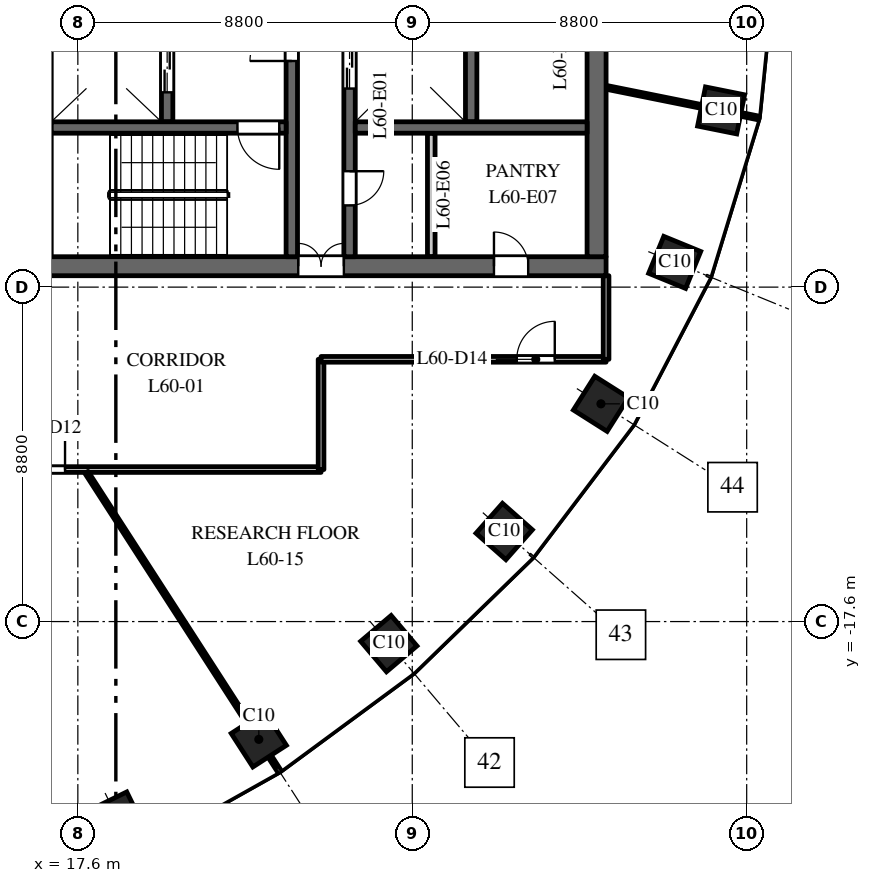
"""IFC4 building model, lengths in metres.
Left out: names, types, materials, properties, quantities, classifications, styles, units other than length and angle.
Written with IfcOpenShell. Run it as: python <this file> out.ifc"""

import sys

from ifc_helpers import new_model, si_unit, direction, frame, frame_2d, origin, origin_2d, place, context, subcontext, project, spatial, rectangle, extrude, element, fill, save


model = new_model("IFC4")
c1 = context("Model", 3, precision=1e-05, world=origin(), true_north=direction((0.0, 1.0)))
c2 = subcontext(c1, "Body", "Model", "MODEL_VIEW")
j1 = project(units=[si_unit("LENGTHUNIT", "METRE"), si_unit("PLANEANGLEUNIT", "RADIAN")], contexts=[c1])
p1 = place(None, origin())
s1 = spatial("IfcSite", under=j1, at=p1, CompositionType="ELEMENT")
p2 = place(p1, origin())
s2 = spatial("IfcBuilding", under=s1, at=p2, CompositionType="ELEMENT")
p3 = place(p2, frame((0.0, 0.0, 281.5)))
s3 = spatial("IfcBuildingStorey", under=s2, at=p3, CompositionType="ELEMENT", Elevation=281.5)
for number, where, z_axis, x_axis in (
    (1, (18.646, -22.785, 0.0), (0.0, 0.0, 1.0), (0.898, 0.439, 0.0)),
    (2, (22.362, -20.7, 0.0), (0.0, 0.0, 1.0), (0.84, 0.542, 0.0)),
    (3, (25.783, -18.18, 0.0), (0.0, 0.0, 1.0), (0.763, 0.646, 0.0)),
    (4, (28.819, -15.23, 0.0), (0.0, 0.0, 1.0), (0.663, 0.749, 0.0)),
    (5, (31.365, -11.871, 0.0), (0.0, 0.0, 1.0), (0.535, 0.845, 0.0)),
    (6, (33.305, -8.149, 0.0), (0.0, 0.0, 1.0), (0.379, 0.925, 0.0)),
    (7, (34.527, -4.151, 0.0), (0.0, 0.0, 1.0), (0.197, 0.98, 0.0)),
):
    element("IfcColumn", number, at=place(p3, frame(where, z_axis=z_axis, x_axis=x_axis)), inside=s3, PredefinedType="COLUMN", context=c2, shape_type="SweptSolid", body=[
        extrude(rectangle(XDim=1.05, YDim=1.05, at=origin_2d()), origin(), (0.0, 0.0, 1.0), 4.0),
    ])
p4 = place(p3, frame((16.5, -8.25, 0.0), z_axis=(0.0, 0.0, 1.0), x_axis=(1.0, 0.0, 0.0)))
e8 = element("IfcWall", 8, at=p4, inside=s3, PredefinedType="SHEAR", context=c2, shape_type="SweptSolid", body=[
    extrude(rectangle(XDim=15.0, YDim=0.5, at=frame_2d((7.5, 0.0))), origin(), (0.0, 0.0, 1.0), 3.7),
])
p5 = place(p4, frame((6.9, 0.0, 0.0)))
e9 = element("IfcOpeningElement", 9, at=p5, cuts=e8, PredefinedType="OPENING", context=c2, shape_type="SweptSolid", body=[
    extrude(rectangle(XDim=1.2, YDim=2.1, at=frame_2d((0.6, 1.05))), frame((0.0, 0.26, 0.0), z_axis=(0.0, -1.0, 0.0), x_axis=(1.0, 0.0, 0.0)), (0.0, 0.0, 1.0), 0.52),
])
p6 = place(p4, frame((12.05, 0.0, 0.0)))
e10 = element("IfcOpeningElement", 10, at=p6, cuts=e8, PredefinedType="OPENING", context=c2, shape_type="SweptSolid", body=[
    extrude(rectangle(XDim=0.9, YDim=2.1, at=frame_2d((0.45, 1.05))), frame((0.0, 0.26, 0.0), z_axis=(0.0, -1.0, 0.0), x_axis=(1.0, 0.0, 0.0)), (0.0, 0.0, 1.0), 0.52),
])
p7 = place(p3, frame((27.95, -4.45, 0.0), z_axis=(0.0, 0.0, 1.0), x_axis=(0.0, 1.0, 0.0)))
e11 = element("IfcWall", 11, at=p7, inside=s3, PredefinedType="SHEAR", context=c2, shape_type="SweptSolid", body=[
    extrude(rectangle(XDim=8.9, YDim=0.3, at=frame_2d((4.45, 0.0))), origin(), (0.0, 0.0, 1.0), 3.7),
])
p8 = place(p3, frame((19.95, -4.45, 0.0), z_axis=(0.0, 0.0, 1.0), x_axis=(0.0, 1.0, 0.0)))
e12 = element("IfcWall", 12, at=p8, inside=s3, PredefinedType="SHEAR", context=c2, shape_type="SweptSolid", body=[
    extrude(rectangle(XDim=8.9, YDim=0.3, at=frame_2d((4.45, 0.0))), origin(), (0.0, 0.0, 1.0), 3.7),
])
p9 = place(p8, frame((0.775, 0.0, 0.0)))
e13 = element("IfcOpeningElement", 13, at=p9, cuts=e12, PredefinedType="OPENING", context=c2, shape_type="SweptSolid", body=[
    extrude(rectangle(XDim=1.2, YDim=2.1, at=frame_2d((0.6, 1.05))), frame((0.0, 0.16, 0.0), z_axis=(0.0, -1.0, 0.0), x_axis=(1.0, 0.0, 0.0)), (0.0, 0.0, 1.0), 0.32),
])
p10 = place(p8, frame((4.675, 0.0, 0.0)))
e14 = element("IfcOpeningElement", 14, at=p10, cuts=e12, PredefinedType="OPENING", context=c2, shape_type="SweptSolid", body=[
    extrude(rectangle(XDim=1.1, YDim=2.1, at=frame_2d((0.55, 1.05))), frame((0.0, 0.16, 0.0), z_axis=(0.0, -1.0, 0.0), x_axis=(1.0, 0.0, 0.0)), (0.0, 0.0, 1.0), 0.32),
])
p11 = place(p8, frame((7.25, 0.0, 0.0)))
e15 = element("IfcOpeningElement", 15, at=p11, cuts=e12, PredefinedType="OPENING", context=c2, shape_type="SweptSolid", body=[
    extrude(rectangle(XDim=1.1, YDim=2.1, at=frame_2d((0.55, 1.05))), frame((0.0, 0.16, 0.0), z_axis=(0.0, -1.0, 0.0), x_axis=(1.0, 0.0, 0.0)), (0.0, 0.0, 1.0), 0.32),
])
p12 = place(p3, frame((24.75, -8.0, 0.0), z_axis=(0.0, 0.0, 1.0), x_axis=(0.0, 1.0, 0.0)))
e16 = element("IfcWall", 16, at=p12, inside=s3, PredefinedType="SHEAR", context=c2, shape_type="SweptSolid", body=[
    extrude(rectangle(XDim=16.0, YDim=0.3, at=frame_2d((8.0, 0.0))), origin(), (0.0, 0.0, 1.0), 3.7),
])
p13 = place(p12, frame((4.425, 0.0, 0.0)))
e17 = element("IfcOpeningElement", 17, at=p13, cuts=e16, PredefinedType="OPENING", context=c2, shape_type="SweptSolid", body=[
    extrude(rectangle(XDim=1.1, YDim=2.1, at=frame_2d((0.55, 1.05))), frame((0.0, 0.16, 0.0), z_axis=(0.0, -1.0, 0.0), x_axis=(1.0, 0.0, 0.0)), (0.0, 0.0, 1.0), 0.32),
])
p14 = place(p12, frame((7.45, 0.0, 0.0)))
e18 = element("IfcOpeningElement", 18, at=p14, cuts=e16, PredefinedType="OPENING", context=c2, shape_type="SweptSolid", body=[
    extrude(rectangle(XDim=1.1, YDim=2.1, at=frame_2d((0.55, 1.05))), frame((0.0, 0.16, 0.0), z_axis=(0.0, -1.0, 0.0), x_axis=(1.0, 0.0, 0.0)), (0.0, 0.0, 1.0), 0.32),
])
p15 = place(p12, frame((10.475, 0.0, 0.0)))
e19 = element("IfcOpeningElement", 19, at=p15, cuts=e16, PredefinedType="OPENING", context=c2, shape_type="SweptSolid", body=[
    extrude(rectangle(XDim=1.1, YDim=2.1, at=frame_2d((0.55, 1.05))), frame((0.0, 0.16, 0.0), z_axis=(0.0, -1.0, 0.0), x_axis=(1.0, 0.0, 0.0)), (0.0, 0.0, 1.0), 0.32),
])
p16 = place(p12, frame((13.75, 0.0, 0.0)))
e20 = element("IfcOpeningElement", 20, at=p16, cuts=e16, PredefinedType="OPENING", context=c2, shape_type="SweptSolid", body=[
    extrude(rectangle(XDim=0.9, YDim=2.1, at=frame_2d((0.45, 1.05))), frame((0.0, 0.16, 0.0), z_axis=(0.0, -1.0, 0.0), x_axis=(1.0, 0.0, 0.0)), (0.0, 0.0, 1.0), 0.32),
])
p17 = place(p12, frame((1.35, 0.0, 0.0)))
e21 = element("IfcOpeningElement", 21, at=p17, cuts=e16, PredefinedType="OPENING", context=c2, shape_type="SweptSolid", body=[
    extrude(rectangle(XDim=0.9, YDim=2.1, at=frame_2d((0.45, 1.05))), frame((0.0, 0.16, 0.0), z_axis=(0.0, -1.0, 0.0), x_axis=(1.0, 0.0, 0.0)), (0.0, 0.0, 1.0), 0.32),
])
p18 = place(p3, frame((31.25, -8.0, 0.0), z_axis=(0.0, 0.0, 1.0), x_axis=(0.0, 1.0, 0.0)))
e22 = element("IfcWall", 22, at=p18, inside=s3, PredefinedType="SHEAR", context=c2, shape_type="SweptSolid", body=[
    extrude(rectangle(XDim=16.0, YDim=0.5, at=frame_2d((8.0, 0.0))), origin(), (0.0, 0.0, 1.0), 3.7),
])
p19 = place(p3, frame((26.9, -8.0, 0.0), z_axis=(0.0, 0.0, 1.0), x_axis=(0.0, 1.0, 0.0)))
e23 = element("IfcWall", 23, at=p19, inside=s3, PredefinedType="PARTITIONING", context=c2, shape_type="SweptSolid", body=[
    extrude(rectangle(XDim=3.25, YDim=0.2, at=frame_2d((1.625, 0.0))), origin(), (0.0, 0.0, 1.0), 3.7),
])
p20 = place(p3, frame((24.9, -4.6, 0.0), z_axis=(0.0, 0.0, 1.0), x_axis=(1.0, 0.0, 0.0)))
e24 = element("IfcWall", 24, at=p20, inside=s3, PredefinedType="SHEAR", context=c2, shape_type="SweptSolid", body=[
    extrude(rectangle(XDim=6.1, YDim=0.3, at=frame_2d((3.05, 0.0))), origin(), (0.0, 0.0, 1.0), 3.7),
])
p21 = place(p3, frame((23.23, -8.0, 0.0), z_axis=(0.0, 0.0, 1.0), x_axis=(0.0, 1.0, 0.0)))
e25 = element("IfcWall", 25, at=p21, inside=s3, PredefinedType="SHEAR", context=c2, shape_type="SweptSolid", body=[
    extrude(rectangle(XDim=7.875, YDim=0.3, at=frame_2d((3.938, 0.0))), origin(), (0.0, 0.0, 1.0), 3.7),
])
p22 = place(p21, frame((5.15, 0.0, 0.0)))
e26 = element("IfcOpeningElement", 26, at=p22, cuts=e25, PredefinedType="OPENING", context=c2, shape_type="SweptSolid", body=[
    extrude(rectangle(XDim=1.1, YDim=2.1, at=frame_2d((0.55, 1.05))), frame((0.0, 0.16, 0.0), z_axis=(0.0, -1.0, 0.0), x_axis=(1.0, 0.0, 0.0)), (0.0, 0.0, 1.0), 0.32),
])
p23 = place(p3, frame((16.9, -4.6, 0.0), z_axis=(0.0, 0.0, 1.0), x_axis=(1.0, 0.0, 0.0)))
e27 = element("IfcWall", 27, at=p23, inside=s3, PredefinedType="SHEAR", context=c2, shape_type="SweptSolid", body=[
    extrude(rectangle(XDim=6.18, YDim=0.3, at=frame_2d((3.09, 0.0))), origin(), (0.0, 0.0, 1.0), 3.7),
])
p24 = place(p23, frame((4.9, 0.0, 0.0)))
e28 = element("IfcOpeningElement", 28, at=p24, cuts=e27, PredefinedType="OPENING", context=c2, shape_type="SweptSolid", body=[
    extrude(rectangle(XDim=1.1, YDim=2.1, at=frame_2d((0.55, 1.05))), frame((0.0, 0.16, 0.0), z_axis=(0.0, -1.0, 0.0), x_axis=(1.0, 0.0, 0.0)), (0.0, 0.0, 1.0), 0.32),
])
p25 = place(p3, frame((0.613, -13.6, 0.0), z_axis=(0.0, 0.0, 1.0), x_axis=(1.0, 0.0, 0.0)))
e29 = element("IfcWall", 29, at=p25, inside=s3, PredefinedType="PARTITIONING", context=c2, shape_type="SweptSolid", body=[
    extrude(rectangle(XDim=23.387, YDim=0.15, at=frame_2d((11.693, 0.0))), origin(), (0.0, 0.0, 1.0), 2.85),
])
p26 = place(p25, frame((15.65, 0.0, 0.0)))
e30 = element("IfcOpeningElement", 30, at=p26, cuts=e29, PredefinedType="OPENING", context=c2, shape_type="SweptSolid", body=[
    extrude(rectangle(XDim=1.0, YDim=2.1, at=frame_2d((0.5, 1.05))), frame((0.0, 0.085, 0.0), z_axis=(0.0, -1.0, 0.0), x_axis=(1.0, 0.0, 0.0)), (0.0, 0.0, 1.0), 0.17),
])
p27 = place(p3, frame((17.828, -13.675, 0.0), z_axis=(0.0, 0.0, 1.0), x_axis=(0.542255150075, -0.840213872902, 0.0)))
e31 = element("IfcWall", 31, at=p27, inside=s3, PredefinedType="PARTITIONING", context=c2, shape_type="SweptSolid", body=[
    extrude(rectangle(XDim=9.363, YDim=0.1, at=frame_2d((4.682, 0.0))), origin(), (0.0, 0.0, 1.0), 3.7),
])
p28 = place(p3, frame((24.0, -13.6, 0.0), z_axis=(0.0, 0.0, 1.0), x_axis=(0.0, 1.0, 0.0)))
e32 = element("IfcWall", 32, at=p28, inside=s3, PredefinedType="PARTITIONING", context=c2, shape_type="SweptSolid", body=[
    extrude(rectangle(XDim=2.9, YDim=0.15, at=frame_2d((1.45, 0.0))), origin(), (0.0, 0.0, 1.0), 2.75),
])
p29 = place(p3, frame((24.0, -10.7, 0.0), z_axis=(0.0, 0.0, 1.0), x_axis=(1.0, 0.0, 0.0)))
e33 = element("IfcWall", 33, at=p29, inside=s3, PredefinedType="PARTITIONING", context=c2, shape_type="SweptSolid", body=[
    extrude(rectangle(XDim=7.5, YDim=0.15, at=frame_2d((3.75, 0.0))), origin(), (0.0, 0.0, 1.0), 3.0),
])
p30 = place(p29, frame((5.15, 0.0, 0.0)))
e34 = element("IfcOpeningElement", 34, at=p30, cuts=e33, PredefinedType="OPENING", context=c2, shape_type="SweptSolid", body=[
    extrude(rectangle(XDim=1.0, YDim=2.1, at=frame_2d((0.5, 1.05))), frame((0.0, 0.085, 0.0), z_axis=(0.0, -1.0, 0.0), x_axis=(1.0, 0.0, 0.0)), (0.0, 0.0, 1.0), 0.17),
])
p31 = place(p3, frame((31.5, -10.7, 0.0), z_axis=(0.0, 0.0, 1.0), x_axis=(0.0, 1.0, 0.0)))
e35 = element("IfcWall", 35, at=p31, inside=s3, PredefinedType="PARTITIONING", context=c2, shape_type="SweptSolid", body=[
    extrude(rectangle(XDim=2.2, YDim=0.15, at=frame_2d((1.1, 0.0))), origin(), (0.0, 0.0, 1.0), 3.0),
])
p32 = place(p3, frame((31.5, -3.542, 0.0), z_axis=(0.0, 0.0, 1.0), x_axis=(0.980357474535, -0.197228857227, 0.0)))
e36 = element("IfcWall", 36, at=p32, inside=s3, PredefinedType="PARTITIONING", context=c2, shape_type="SweptSolid", body=[
    extrude(rectangle(XDim=4.092, YDim=0.1, at=frame_2d((2.046, 0.0))), origin(), (0.0, 0.0, 1.0), 3.0),
])
p33 = place(p9, origin())
e37 = element("IfcDoor", 37, at=p33, inside=s3, OperationType="DOUBLE_DOOR_SLIDING", PredefinedType="DOOR", context=c2, shape_type="SweptSolid", body=[
    extrude(rectangle(XDim=1.2, YDim=2.1, at=frame_2d((0.6, 1.05))), frame((0.0, 0.025, 0.0), z_axis=(0.0, -1.0, 0.0), x_axis=(1.0, 0.0, 0.0)), (0.0, 0.0, 1.0), 0.05),
])
fill(e13, e37)
p34 = place(p13, origin())
e38 = element("IfcDoor", 38, at=p34, inside=s3, OperationType="DOUBLE_DOOR_SLIDING", PredefinedType="DOOR", context=c2, shape_type="SweptSolid", body=[
    extrude(rectangle(XDim=1.1, YDim=2.1, at=frame_2d((0.55, 1.05))), frame((0.0, 0.025, 0.0), z_axis=(0.0, -1.0, 0.0), x_axis=(1.0, 0.0, 0.0)), (0.0, 0.0, 1.0), 0.05),
])
fill(e17, e38)
p35 = place(p24, origin())
e39 = element("IfcDoor", 39, at=p35, inside=s3, OperationType="SINGLE_SWING_RIGHT", PredefinedType="DOOR", context=c2, shape_type="SweptSolid", body=[
    extrude(rectangle(XDim=1.1, YDim=2.1, at=frame_2d((0.55, 1.05))), frame((0.0, 0.025, 0.0), z_axis=(0.0, -1.0, 0.0), x_axis=(1.0, 0.0, 0.0)), (0.0, 0.0, 1.0), 0.05),
])
fill(e28, e39)
p36 = place(p22, origin())
e40 = element("IfcDoor", 40, at=p36, inside=s3, OperationType="SINGLE_SWING_RIGHT", PredefinedType="DOOR", context=c2, shape_type="SweptSolid", body=[
    extrude(rectangle(XDim=1.1, YDim=2.1, at=frame_2d((0.55, 1.05))), frame((0.0, 0.025, 0.0), z_axis=(0.0, -1.0, 0.0), x_axis=(1.0, 0.0, 0.0)), (0.0, 0.0, 1.0), 0.05),
])
fill(e26, e40)
p37 = place(p5, origin())
e41 = element("IfcDoor", 41, at=p37, inside=s3, OperationType="DOUBLE_DOOR_DOUBLE_SWING", PredefinedType="DOOR", context=c2, shape_type="SweptSolid", body=[
    extrude(rectangle(XDim=1.2, YDim=2.1, at=frame_2d((0.6, 1.05))), frame((0.0, 0.025, 0.0), z_axis=(0.0, -1.0, 0.0), x_axis=(1.0, 0.0, 0.0)), (0.0, 0.0, 1.0), 0.05),
])
fill(e9, e41)
p38 = place(p17, origin())
e42 = element("IfcDoor", 42, at=p38, inside=s3, OperationType="SINGLE_SWING_RIGHT", PredefinedType="DOOR", context=c2, shape_type="SweptSolid", body=[
    extrude(rectangle(XDim=0.9, YDim=2.1, at=frame_2d((0.45, 1.05))), frame((0.0, 0.025, 0.0), z_axis=(0.0, -1.0, 0.0), x_axis=(1.0, 0.0, 0.0)), (0.0, 0.0, 1.0), 0.05),
])
fill(e21, e42)
p39 = place(p6, origin())
e43 = element("IfcDoor", 43, at=p39, inside=s3, OperationType="SINGLE_SWING_RIGHT", PredefinedType="DOOR", context=c2, shape_type="SweptSolid", body=[
    extrude(rectangle(XDim=0.9, YDim=2.1, at=frame_2d((0.45, 1.05))), frame((0.0, 0.025, 0.0), z_axis=(0.0, -1.0, 0.0), x_axis=(1.0, 0.0, 0.0)), (0.0, 0.0, 1.0), 0.05),
])
fill(e10, e43)
p40 = place(p26, origin())
e44 = element("IfcDoor", 44, at=p40, inside=s3, OperationType="SINGLE_SWING_RIGHT", PredefinedType="DOOR", context=c2, shape_type="SweptSolid", body=[
    extrude(rectangle(XDim=1.0, YDim=2.1, at=frame_2d((0.5, 1.05))), frame((0.0, 0.025, 0.0), z_axis=(0.0, -1.0, 0.0), x_axis=(1.0, 0.0, 0.0)), (0.0, 0.0, 1.0), 0.05),
])
fill(e30, e44)
p41 = place(p30, origin())
e45 = element("IfcDoor", 45, at=p41, inside=s3, OperationType="SINGLE_SWING_RIGHT", PredefinedType="DOOR", context=c2, shape_type="SweptSolid", body=[
    extrude(rectangle(XDim=1.0, YDim=2.1, at=frame_2d((0.5, 1.05))), frame((0.0, 0.025, 0.0), z_axis=(0.0, -1.0, 0.0), x_axis=(1.0, 0.0, 0.0)), (0.0, 0.0, 1.0), 0.05),
])
fill(e34, e45)
save(model, sys.argv[1])
